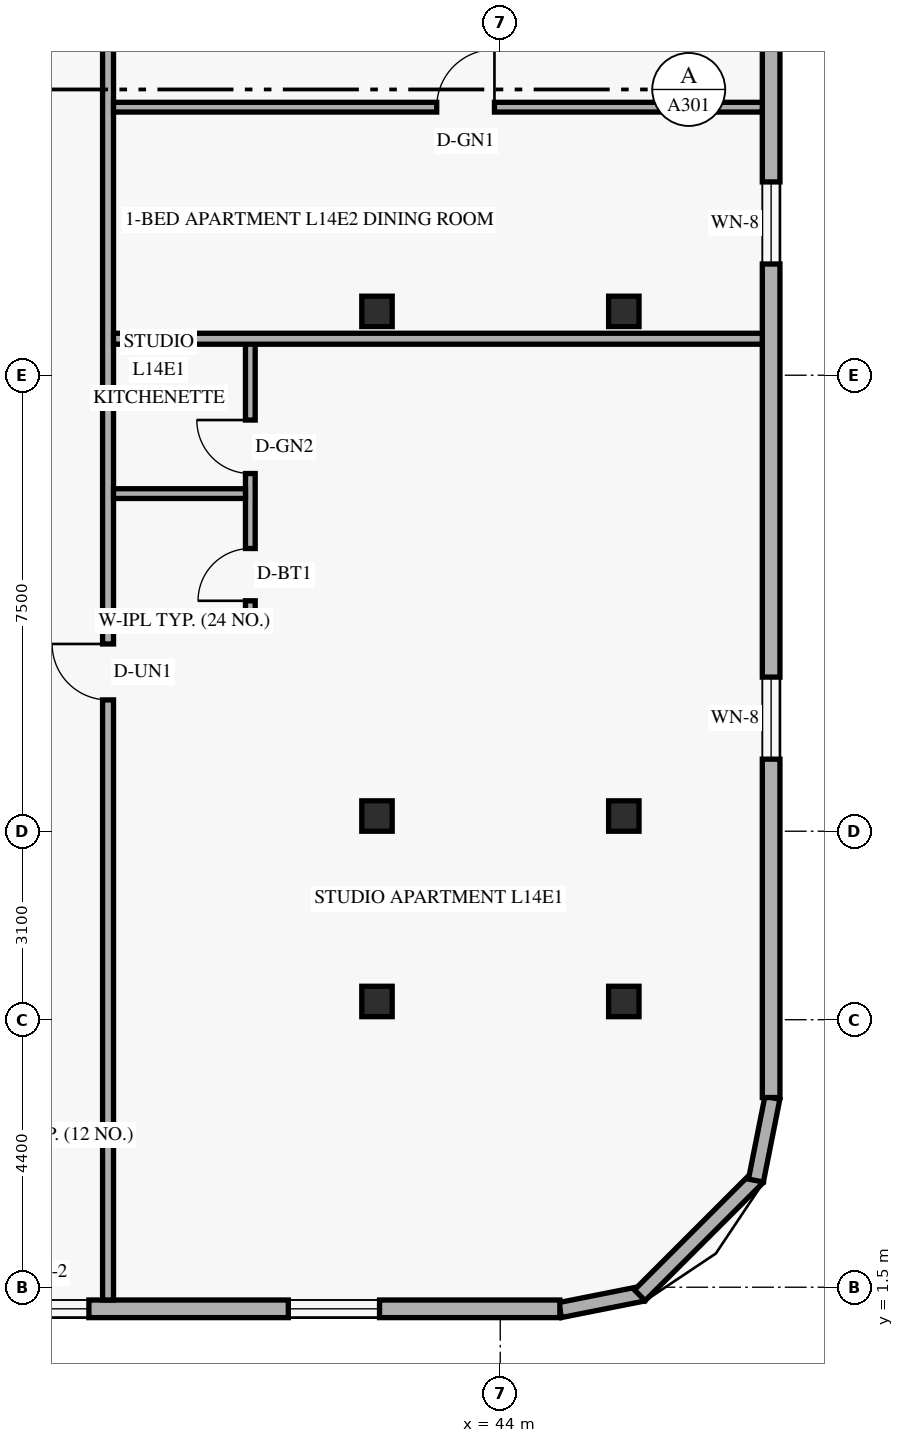
"""IFC4 building model, lengths in metres.
Left out: names, types, materials, properties, quantities, classifications, styles, units other than length and angle.
Written with IfcOpenShell. Run it as: python <this file> out.ifc"""

import sys

from ifc_helpers import new_model, si_unit, direction, frame, frame_2d, origin, origin_2d, place, context, subcontext, project, spatial, rectangle, hollow_rectangle, extrude, element, fill, save


model = new_model("IFC4")
c1 = context("Model", 3, precision=1e-05, world=origin(), true_north=direction((0.0, 1.0)))
c2 = subcontext(c1, "Body", "Model", "MODEL_VIEW")
j1 = project(units=[si_unit("LENGTHUNIT", "METRE"), si_unit("PLANEANGLEUNIT", "RADIAN")], contexts=[c1])
p1 = place(None, origin())
s1 = spatial("IfcSite", under=j1, at=p1, CompositionType="ELEMENT")
p2 = place(p1, origin())
s2 = spatial("IfcBuilding", under=s1, at=p2, CompositionType="ELEMENT")
p3 = place(p2, frame((0.0, 0.0, 56.4)))
s3 = spatial("IfcBuildingStorey", under=s2, at=p3, CompositionType="ELEMENT", Elevation=56.4)
for number, where, z_axis, x_axis in (
    (1, (41.91, 6.2, 0.0), (0.035, 0.0, 0.999), (0.0, 1.0, 0.0)),
    (2, (41.91, 9.25, 0.0), (0.035, 0.0, 0.999), (0.0, 1.0, 0.0)),
    (3, (41.91, 17.55, 0.0), (0.035, 0.0, 0.999), (0.0, 1.0, 0.0)),
):
    element("IfcColumn", number, at=place(p3, frame(where, z_axis=z_axis, x_axis=x_axis)), inside=s3, PredefinedType="COLUMN", context=c2, shape_type="SweptSolid", body=[
        extrude(hollow_rectangle(XDim=0.5, YDim=0.5, WallThickness=0.022, at=origin_2d()), origin(), (0.0, 0.0, 1.0), 3.602),
    ])
for number, where, z_axis, x_axis in (
    (4, (45.928, 6.2, 0.0), (0.058, 0.0, 0.998), (0.0, 1.0, 0.0)),
    (5, (45.928, 9.25, 0.0), (0.058, 0.0, 0.998), (0.0, 1.0, 0.0)),
    (6, (45.928, 17.55, 0.0), (0.058, 0.0, 0.998), (0.0, 1.0, 0.0)),
):
    element("IfcColumn", number, at=place(p3, frame(where, z_axis=z_axis, x_axis=x_axis)), inside=s3, PredefinedType="COLUMN", context=c2, shape_type="SweptSolid", body=[
        extrude(hollow_rectangle(XDim=0.5, YDim=0.5, WallThickness=0.022, at=origin_2d()), origin(), (0.0, 0.0, 1.0), 3.606),
    ])
p4 = place(p3, frame((44.983, 1.124, 0.0), z_axis=(0.0, 0.0, 1.0), x_axis=(0.980809899341, 0.19496651342, 0.0)))
e7 = element("IfcWall", 7, at=p4, inside=s3, PredefinedType="SOLIDWALL", context=c2, shape_type="SweptSolid", body=[
    extrude(rectangle(XDim=1.389, YDim=0.25, at=frame_2d((0.694, 0.0))), origin(), (0.0, 0.0, 1.0), 3.35),
])
p5 = place(p3, frame((46.295, 1.368, 0.0), z_axis=(0.0, 0.0, 1.0), x_axis=(0.707106781187, 0.707106781187, 0.0)))
e8 = element("IfcWall", 8, at=p5, inside=s3, PredefinedType="SOLIDWALL", context=c2, shape_type="SweptSolid", body=[
    extrude(rectangle(XDim=2.739, YDim=0.25, at=frame_2d((1.37, 0.0))), origin(), (0.0, 0.0, 1.0), 3.35),
])
p6 = place(p3, frame((48.205, 3.254, 0.0), z_axis=(0.0, 0.0, 1.0), x_axis=(0.19496651342, 0.980809899341, 0.0)))
e9 = element("IfcWall", 9, at=p6, inside=s3, PredefinedType="SOLIDWALL", context=c2, shape_type="SweptSolid", body=[
    extrude(rectangle(XDim=1.389, YDim=0.25, at=frame_2d((0.694, 0.0))), origin(), (0.0, 0.0, 1.0), 3.35),
])
p7 = place(p3, frame((34.4, 1.145, 0.0), z_axis=(0.0, 0.0, 1.0), x_axis=(1.0, 0.0, 0.0)))
e10 = element("IfcWall", 10, at=p7, inside=s3, PredefinedType="SOLIDWALL", context=c2, shape_type="SweptSolid", body=[
    extrude(rectangle(XDim=10.58, YDim=0.29, at=frame_2d((5.29, 0.0))), origin(), (0.0, 0.0, 1.0), 3.35),
])
p8 = place(p7, frame((1.335, 0.0, 0.85)))
e11 = element("IfcOpeningElement", 11, at=p8, cuts=e10, PredefinedType="OPENING", context=c2, shape_type="SweptSolid", body=[
    extrude(rectangle(XDim=1.5, YDim=1.55, at=frame_2d((0.75, 0.775))), frame((0.0, 0.155, 0.0), z_axis=(0.0, -1.0, 0.0), x_axis=(1.0, 0.0, 0.0)), (0.0, 0.0, 1.0), 0.31),
])
p9 = place(p7, frame((6.115, 0.0, 0.85)))
e12 = element("IfcOpeningElement", 12, at=p9, cuts=e10, PredefinedType="OPENING", context=c2, shape_type="SweptSolid", body=[
    extrude(rectangle(XDim=1.5, YDim=1.55, at=frame_2d((0.75, 0.775))), frame((0.0, 0.155, 0.0), z_axis=(0.0, -1.0, 0.0), x_axis=(1.0, 0.0, 0.0)), (0.0, 0.0, 1.0), 0.31),
])
p10 = place(p3, frame((48.455, 4.62, 0.0), z_axis=(0.0, 0.0, 1.0), x_axis=(0.0, 1.0, 0.0)))
e13 = element("IfcWall", 13, at=p10, inside=s3, PredefinedType="SOLIDWALL", context=c2, shape_type="SweptSolid", body=[
    extrude(rectangle(XDim=38.76, YDim=0.29, at=frame_2d((19.38, 0.0))), origin(), (0.0, 0.0, 1.0), 3.35),
])
p11 = place(p10, frame((5.565, 0.0, 0.85)))
e14 = element("IfcOpeningElement", 14, at=p11, cuts=e13, PredefinedType="OPENING", context=c2, shape_type="SweptSolid", body=[
    extrude(rectangle(XDim=1.35, YDim=1.55, at=frame_2d((0.675, 0.775))), frame((0.0, 0.155, 0.0), z_axis=(0.0, -1.0, 0.0), x_axis=(1.0, 0.0, 0.0)), (0.0, 0.0, 1.0), 0.31),
])
p12 = place(p10, frame((13.709, 0.0, 0.85)))
e15 = element("IfcOpeningElement", 15, at=p12, cuts=e13, PredefinedType="OPENING", context=c2, shape_type="SweptSolid", body=[
    extrude(rectangle(XDim=1.35, YDim=1.55, at=frame_2d((0.675, 0.775))), frame((0.0, 0.155, 0.0), z_axis=(0.0, -1.0, 0.0), x_axis=(1.0, 0.0, 0.0)), (0.0, 0.0, 1.0), 0.31),
])
p13 = place(p10, frame((19.284, 0.0, 0.85)))
e16 = element("IfcOpeningElement", 16, at=p13, cuts=e13, PredefinedType="OPENING", context=c2, shape_type="SweptSolid", body=[
    extrude(rectangle(XDim=1.35, YDim=1.55, at=frame_2d((0.675, 0.775))), frame((0.0, 0.155, 0.0), z_axis=(0.0, -1.0, 0.0), x_axis=(1.0, 0.0, 0.0)), (0.0, 0.0, 1.0), 0.31),
])
p14 = place(p10, frame((25.2, 0.0, 0.85)))
e17 = element("IfcOpeningElement", 17, at=p14, cuts=e13, PredefinedType="OPENING", context=c2, shape_type="SweptSolid", body=[
    extrude(rectangle(XDim=1.35, YDim=1.55, at=frame_2d((0.675, 0.775))), frame((0.0, 0.155, 0.0), z_axis=(0.0, -1.0, 0.0), x_axis=(1.0, 0.0, 0.0)), (0.0, 0.0, 1.0), 0.31),
])
p15 = place(p10, frame((28.914, 0.0, 0.85)))
e18 = element("IfcOpeningElement", 18, at=p15, cuts=e13, PredefinedType="OPENING", context=c2, shape_type="SweptSolid", body=[
    extrude(rectangle(XDim=1.35, YDim=1.55, at=frame_2d((0.675, 0.775))), frame((0.0, 0.155, 0.0), z_axis=(0.0, -1.0, 0.0), x_axis=(1.0, 0.0, 0.0)), (0.0, 0.0, 1.0), 0.31),
])
p16 = place(p10, frame((33.975, 0.0, 0.85)))
e19 = element("IfcOpeningElement", 19, at=p16, cuts=e13, PredefinedType="OPENING", context=c2, shape_type="SweptSolid", body=[
    extrude(rectangle(XDim=1.35, YDim=1.55, at=frame_2d((0.675, 0.775))), frame((0.0, 0.155, 0.0), z_axis=(0.0, -1.0, 0.0), x_axis=(1.0, 0.0, 0.0)), (0.0, 0.0, 1.0), 0.31),
])
p17 = place(p3, frame((37.55, 1.29, 0.0), z_axis=(0.0, 0.0, 1.0), x_axis=(0.0, 1.0, 0.0)))
e20 = element("IfcWall", 20, at=p17, inside=s3, PredefinedType="STANDARD", context=c2, shape_type="SweptSolid", body=[
    extrude(rectangle(XDim=45.42, YDim=0.18, at=frame_2d((22.71, 0.0))), origin(), (0.0, 0.0, 1.0), 2.639),
])
p18 = place(p17, frame((9.87, 0.0, 0.0)))
e21 = element("IfcOpeningElement", 21, at=p18, cuts=e20, PredefinedType="OPENING", context=c2, shape_type="SweptSolid", body=[
    extrude(rectangle(XDim=0.92, YDim=2.15, at=frame_2d((0.46, 1.075))), frame((0.0, 0.1, 0.0), z_axis=(0.0, -1.0, 0.0), x_axis=(1.0, 0.0, 0.0)), (0.0, 0.0, 1.0), 0.2),
])
p19 = place(p17, frame((20.953, 0.0, 0.0)))
e22 = element("IfcOpeningElement", 22, at=p19, cuts=e20, PredefinedType="OPENING", context=c2, shape_type="SweptSolid", body=[
    extrude(rectangle(XDim=0.92, YDim=2.15, at=frame_2d((0.46, 1.075))), frame((0.0, 0.1, 0.0), z_axis=(0.0, -1.0, 0.0), x_axis=(1.0, 0.0, 0.0)), (0.0, 0.0, 1.0), 0.2),
])
p20 = place(p17, frame((35.534, 0.0, 0.0)))
e23 = element("IfcOpeningElement", 23, at=p20, cuts=e20, PredefinedType="OPENING", context=c2, shape_type="SweptSolid", body=[
    extrude(rectangle(XDim=0.92, YDim=2.15, at=frame_2d((0.46, 1.075))), frame((0.0, 0.1, 0.0), z_axis=(0.0, -1.0, 0.0), x_axis=(1.0, 0.0, 0.0)), (0.0, 0.0, 1.0), 0.2),
])
p21 = place(p3, frame((37.64, 12.46, 0.0), z_axis=(0.0, 0.0, 1.0), x_axis=(1.0, 0.0, 0.0)))
e24 = element("IfcWall", 24, at=p21, inside=s3, PredefinedType="PLUMBINGWALL", context=c2, shape_type="SweptSolid", body=[
    extrude(rectangle(XDim=2.33, YDim=0.16, at=frame_2d((1.165, 0.0))), origin(), (0.0, 0.0, 1.0), 3.35),
])
p22 = place(p3, frame((39.89, 12.37, 0.0), z_axis=(0.0, 0.0, 1.0), x_axis=(0.0, 1.0, 0.0)))
e25 = element("IfcWall", 25, at=p22, inside=s3, PredefinedType="PLUMBINGWALL", context=c2, shape_type="SweptSolid", body=[
    extrude(rectangle(XDim=4.73, YDim=0.16, at=frame_2d((2.365, 0.0))), origin(), (0.0, 0.0, 1.0), 2.922),
])
p23 = place(p22, frame((0.42, 0.0, 0.0)))
e26 = element("IfcOpeningElement", 26, at=p23, cuts=e25, PredefinedType="OPENING", context=c2, shape_type="SweptSolid", body=[
    extrude(rectangle(XDim=0.86, YDim=2.12, at=frame_2d((0.43, 1.06))), frame((0.0, 0.09, 0.0), z_axis=(0.0, -1.0, 0.0), x_axis=(1.0, 0.0, 0.0)), (0.0, 0.0, 1.0), 0.18),
])
p24 = place(p22, frame((2.513, 0.0, 0.0)))
e27 = element("IfcOpeningElement", 27, at=p24, cuts=e25, PredefinedType="OPENING", context=c2, shape_type="SweptSolid", body=[
    extrude(rectangle(XDim=0.88, YDim=2.12, at=frame_2d((0.44, 1.06))), frame((0.0, 0.09, 0.0), z_axis=(0.0, -1.0, 0.0), x_axis=(1.0, 0.0, 0.0)), (0.0, 0.0, 1.0), 0.18),
])
p25 = place(p3, frame((37.64, 14.553, 0.0), z_axis=(0.0, 0.0, 1.0), x_axis=(1.0, 0.0, 0.0)))
e28 = element("IfcWall", 28, at=p25, inside=s3, PredefinedType="PLUMBINGWALL", context=c2, shape_type="SweptSolid", body=[
    extrude(rectangle(XDim=2.17, YDim=0.16, at=frame_2d((1.085, 0.0))), origin(), (0.0, 0.0, 1.0), 3.35),
])
p26 = place(p3, frame((37.64, 17.1, 0.0), z_axis=(0.0, 0.0, 1.0), x_axis=(1.0, 0.0, 0.0)))
e29 = element("IfcWall", 29, at=p26, inside=s3, PredefinedType="PARTITIONING", context=c2, shape_type="SweptSolid", body=[
    extrude(rectangle(XDim=10.67, YDim=0.18, at=frame_2d((5.335, 0.0))), origin(), (0.0, 0.0, 1.0), 2.639),
])
p27 = place(p3, frame((37.64, 20.908, 0.0), z_axis=(0.0, 0.0, 1.0), x_axis=(1.0, 0.0, 0.0)))
e30 = element("IfcWall", 30, at=p27, inside=s3, PredefinedType="PARTITIONING", context=c2, shape_type="SweptSolid", body=[
    extrude(rectangle(XDim=10.67, YDim=0.16, at=frame_2d((5.335, 0.0))), origin(), (0.0, 0.0, 1.0), 2.639),
])
p28 = place(p27, frame((5.315, 0.0, 0.0)))
e31 = element("IfcOpeningElement", 31, at=p28, cuts=e30, PredefinedType="OPENING", context=c2, shape_type="SweptSolid", body=[
    extrude(rectangle(XDim=0.95, YDim=2.15, at=frame_2d((0.475, 1.075))), frame((0.0, 0.09, 0.0), z_axis=(0.0, -1.0, 0.0), x_axis=(1.0, 0.0, 0.0)), (0.0, 0.0, 1.0), 0.18),
])
p29 = place(p8, origin())
e32 = element("IfcWindow", 32, at=p29, inside=s3, PartitioningType="SINGLE_PANEL", PredefinedType="WINDOW", context=c2, shape_type="SweptSolid", body=[
    extrude(rectangle(XDim=1.5, YDim=1.55, at=frame_2d((0.75, 0.775))), frame((0.0, 0.03, 0.0), z_axis=(0.0, -1.0, 0.0), x_axis=(1.0, 0.0, 0.0)), (0.0, 0.0, 1.0), 0.06),
])
fill(e11, e32)
p30 = place(p9, origin())
e33 = element("IfcWindow", 33, at=p30, inside=s3, PartitioningType="SINGLE_PANEL", PredefinedType="WINDOW", context=c2, shape_type="SweptSolid", body=[
    extrude(rectangle(XDim=1.5, YDim=1.55, at=frame_2d((0.75, 0.775))), frame((0.0, 0.03, 0.0), z_axis=(0.0, -1.0, 0.0), x_axis=(1.0, 0.0, 0.0)), (0.0, 0.0, 1.0), 0.06),
])
fill(e12, e33)
p31 = place(p11, origin())
e34 = element("IfcWindow", 34, at=p31, inside=s3, PartitioningType="SINGLE_PANEL", PredefinedType="WINDOW", context=c2, shape_type="SweptSolid", body=[
    extrude(rectangle(XDim=1.35, YDim=1.55, at=frame_2d((0.675, 0.775))), frame((0.0, 0.03, 0.0), z_axis=(0.0, -1.0, 0.0), x_axis=(1.0, 0.0, 0.0)), (0.0, 0.0, 1.0), 0.06),
])
fill(e14, e34)
p32 = place(p12, origin())
e35 = element("IfcWindow", 35, at=p32, inside=s3, PartitioningType="SINGLE_PANEL", PredefinedType="WINDOW", context=c2, shape_type="SweptSolid", body=[
    extrude(rectangle(XDim=1.35, YDim=1.55, at=frame_2d((0.675, 0.775))), frame((0.0, 0.03, 0.0), z_axis=(0.0, -1.0, 0.0), x_axis=(1.0, 0.0, 0.0)), (0.0, 0.0, 1.0), 0.06),
])
fill(e15, e35)
p33 = place(p18, origin())
e36 = element("IfcDoor", 36, at=p33, inside=s3, OperationType="SINGLE_SWING_RIGHT", PredefinedType="DOOR", context=c2, shape_type="SweptSolid", body=[
    extrude(rectangle(XDim=0.92, YDim=2.15, at=frame_2d((0.46, 1.075))), frame((0.0, 0.025, 0.0), z_axis=(0.0, -1.0, 0.0), x_axis=(1.0, 0.0, 0.0)), (0.0, 0.0, 1.0), 0.05),
])
fill(e21, e36)
p34 = place(p23, origin())
e37 = element("IfcDoor", 37, at=p34, inside=s3, OperationType="SINGLE_SWING_LEFT", PredefinedType="DOOR", context=c2, shape_type="SweptSolid", body=[
    extrude(rectangle(XDim=0.86, YDim=2.12, at=frame_2d((0.43, 1.06))), frame((0.0, 0.025, 0.0), z_axis=(0.0, -1.0, 0.0), x_axis=(1.0, 0.0, 0.0)), (0.0, 0.0, 1.0), 0.05),
])
fill(e26, e37)
p35 = place(p24, origin())
e38 = element("IfcDoor", 38, at=p35, inside=s3, OperationType="SINGLE_SWING_RIGHT", PredefinedType="DOOR", context=c2, shape_type="SweptSolid", body=[
    extrude(rectangle(XDim=0.88, YDim=2.12, at=frame_2d((0.44, 1.06))), frame((0.0, 0.025, 0.0), z_axis=(0.0, -1.0, 0.0), x_axis=(1.0, 0.0, 0.0)), (0.0, 0.0, 1.0), 0.05),
])
fill(e27, e38)
p36 = place(p28, origin())
e39 = element("IfcDoor", 39, at=p36, inside=s3, OperationType="SINGLE_SWING_RIGHT", PredefinedType="DOOR", context=c2, shape_type="SweptSolid", body=[
    extrude(rectangle(XDim=0.95, YDim=2.15, at=frame_2d((0.475, 1.075))), frame((0.0, 0.025, 0.0), z_axis=(0.0, -1.0, 0.0), x_axis=(1.0, 0.0, 0.0)), (0.0, 0.0, 1.0), 0.05),
])
fill(e31, e39)
save(model, sys.argv[1])
